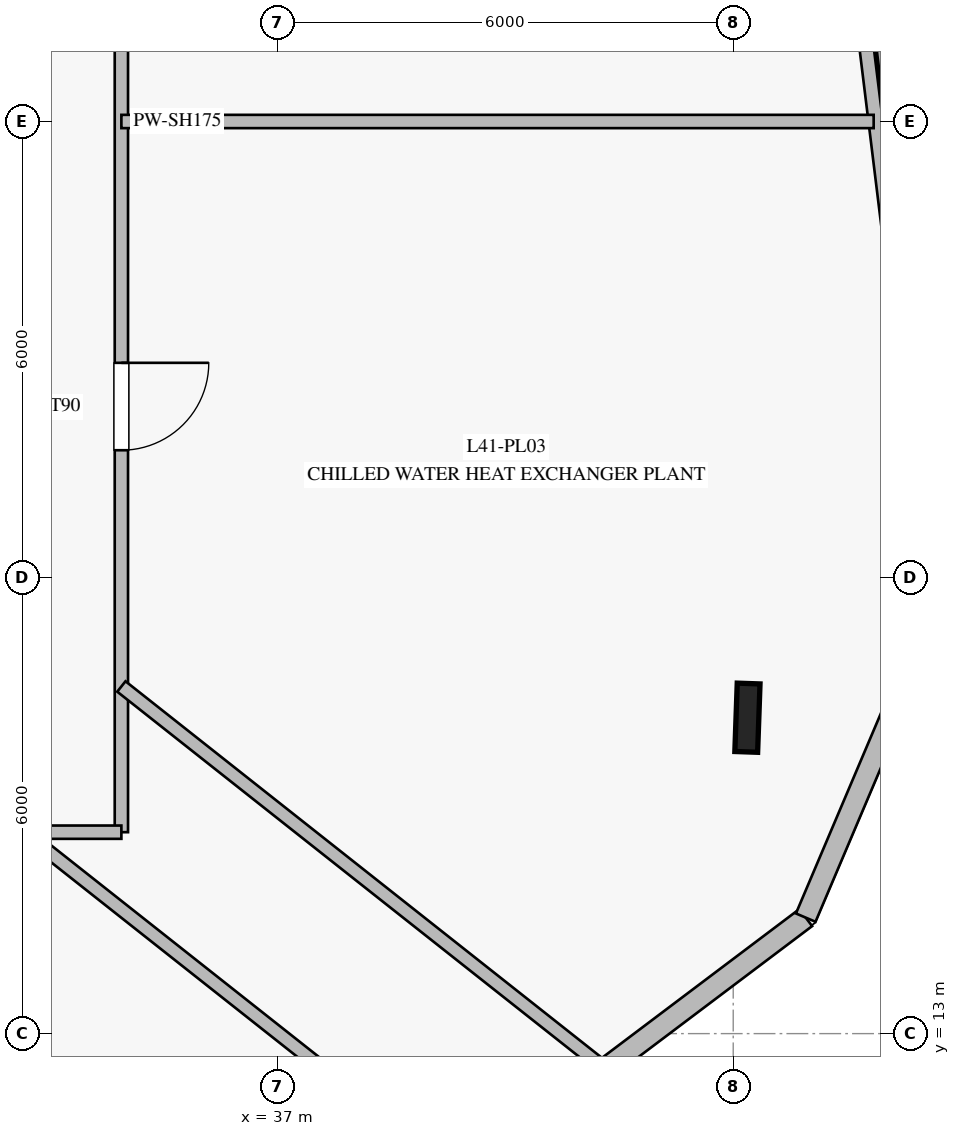
"""IFC4 building model, lengths in metres.
Left out: names, types, materials, properties, quantities, classifications, styles, units other than length and angle.
Written with IfcOpenShell. Run it as: python <this file> out.ifc"""

import sys

from ifc_helpers import new_model, si_unit, direction, frame, frame_2d, origin, origin_2d, place, context, subcontext, project, spatial, rectangle, i_section, extrude, element, fill, save


model = new_model("IFC4")
c1 = context("Model", 3, precision=1e-05, world=origin(), true_north=direction((0.0, 1.0)))
c2 = subcontext(c1, "Body", "Model", "MODEL_VIEW")
j1 = project(units=[si_unit("LENGTHUNIT", "METRE"), si_unit("PLANEANGLEUNIT", "RADIAN")], contexts=[c1])
p1 = place(None, origin())
s1 = spatial("IfcSite", under=j1, at=p1, CompositionType="ELEMENT")
p2 = place(p1, origin())
s2 = spatial("IfcBuilding", under=s1, at=p2, CompositionType="ELEMENT")
p3 = place(p2, frame((0.0, 0.0, 170.4)))
s3 = spatial("IfcBuildingStorey", under=s2, at=p3, CompositionType="ELEMENT", Elevation=170.4)
p4 = place(p3, frame((43.187, 17.156, 0.0), z_axis=(0.0, 0.0, 1.0), x_axis=(0.034899496703, 0.999390827019, 0.0)))
e1 = element("IfcColumn", 1, at=p4, inside=s3, PredefinedType="COLUMN", context=c2, shape_type="SweptSolid", body=[
    extrude(i_section(OverallWidth=0.3, OverallDepth=0.9, WebThickness=0.019, FlangeThickness=0.035, at=origin_2d()), origin(), (0.0, 0.0, 1.0), 5.4),
])
p5 = place(p3, frame((29.844, 3.892, 0.0), z_axis=(0.0, 0.0, 1.0), x_axis=(0.798606661406, 0.601853304684, 0.0)))
e2 = element("IfcWall", 2, at=p5, inside=s3, PredefinedType="STANDARD", context=c2, shape_type="SweptSolid", body=[
    extrude(rectangle(XDim=17.668, YDim=0.28, at=frame_2d((8.834, 0.0))), origin(), (0.0, 0.0, 1.0), 5.14),
])
p6 = place(p3, frame((43.954, 14.526, 0.0), z_axis=(0.0, 0.0, 1.0), x_axis=(0.390733557702, 0.920503822309, 0.0)))
e3 = element("IfcWall", 3, at=p6, inside=s3, PredefinedType="STANDARD", context=c2, shape_type="SweptSolid", body=[
    extrude(rectangle(XDim=4.471, YDim=0.28, at=frame_2d((2.235, 0.0))), origin(), (0.0, 0.0, 1.0), 5.14),
])
p7 = place(p3, frame((45.701, 18.641, 0.0), z_axis=(0.0, 0.0, 1.0), x_axis=(-0.121845687451, 0.992549055941, 0.0)))
e4 = element("IfcWall", 4, at=p7, inside=s3, PredefinedType="STANDARD", context=c2, shape_type="SweptSolid", body=[
    extrude(rectangle(XDim=17.668, YDim=0.28, at=frame_2d((8.834, 0.0))), origin(), (0.0, 0.0, 1.0), 5.14),
])
p8 = place(p3, frame((34.95, 34.35, 0.0), z_axis=(0.0, 0.0, 1.0), x_axis=(0.0, -1.0, 0.0)))
e5 = element("IfcWall", 5, at=p8, inside=s3, PredefinedType="PARTITIONING", context=c2, shape_type="SweptSolid", body=[
    extrude(rectangle(XDim=18.7, YDim=0.175, at=frame_2d((9.35, 0.0))), origin(), (0.0, 0.0, 1.0), 3.54),
])
p9 = place(p8, frame((12.525, 0.0, 0.0)))
e6 = element("IfcOpeningElement", 6, at=p9, cuts=e5, PredefinedType="OPENING", context=c2, shape_type="SweptSolid", body=[
    extrude(rectangle(XDim=1.15, YDim=2.2, at=frame_2d((0.575, 1.1))), frame((0.0, 0.098, 0.0), z_axis=(0.0, -1.0, 0.0), x_axis=(1.0, 0.0, 0.0)), (0.0, 0.0, 1.0), 0.195),
])
p10 = place(p8, frame((5.2, 0.0, 0.0)))
e7 = element("IfcOpeningElement", 7, at=p10, cuts=e5, PredefinedType="OPENING", context=c2, shape_type="SweptSolid", body=[
    extrude(rectangle(XDim=1.15, YDim=2.2, at=frame_2d((0.575, 1.1))), frame((0.0, 0.098, 0.0), z_axis=(0.0, -1.0, 0.0), x_axis=(1.0, 0.0, 0.0)), (0.0, 0.0, 1.0), 0.195),
])
p11 = place(p3, frame((34.95, 15.65, 0.0), z_axis=(0.0, 0.0, 1.0), x_axis=(-1.0, 0.0, 0.0)))
e8 = element("IfcWall", 8, at=p11, inside=s3, PredefinedType="PARTITIONING", context=c2, shape_type="SweptSolid", body=[
    extrude(rectangle(XDim=19.9, YDim=0.175, at=frame_2d((9.95, 0.0))), origin(), (0.0, 0.0, 1.0), 3.54),
])
p12 = place(p11, frame((9.611, 0.0, 0.0)))
e9 = element("IfcOpeningElement", 9, at=p12, cuts=e8, PredefinedType="OPENING", context=c2, shape_type="SweptSolid", body=[
    extrude(rectangle(XDim=1.15, YDim=2.2, at=frame_2d((0.575, 1.1))), frame((0.0, 0.098, 0.0), z_axis=(0.0, -1.0, 0.0), x_axis=(1.0, 0.0, 0.0)), (0.0, 0.0, 1.0), 0.195),
])
p13 = place(p3, frame((33.666, 15.65, 0.0), z_axis=(0.0, 0.0, 1.0), x_axis=(0.784600993116, -0.620001033549, 0.0)))
e10 = element("IfcWall", 10, at=p13, inside=s3, PredefinedType="PARTITIONING", context=c2, shape_type="SweptSolid", body=[
    extrude(rectangle(XDim=7.254, YDim=0.175, at=frame_2d((3.627, 0.0))), origin(), (0.0, 0.0, 1.0), 3.53),
])
p14 = place(p3, frame((34.95, 17.567, 0.0), z_axis=(0.0, 0.0, 1.0), x_axis=(0.784559222655, -0.620053889712, 0.0)))
e11 = element("IfcWall", 11, at=p14, inside=s3, PredefinedType="PARTITIONING", context=c2, shape_type="SweptSolid", body=[
    extrude(rectangle(XDim=8.038, YDim=0.175, at=frame_2d((4.019, 0.0))), origin(), (0.0, 0.0, 1.0), 3.53),
])
p15 = place(p3, frame((34.95, 25.0, 0.0), z_axis=(0.0, 0.0, 1.0), x_axis=(1.0, 0.0, 0.0)))
e12 = element("IfcWall", 12, at=p15, inside=s3, PredefinedType="PARTITIONING", context=c2, shape_type="SweptSolid", body=[
    extrude(rectangle(XDim=9.898, YDim=0.175, at=frame_2d((4.949, 0.0))), origin(), (0.0, 0.0, 1.0), 3.53),
])
p16 = place(p9, origin())
e13 = element("IfcDoor", 13, at=p16, inside=s3, OperationType="SINGLE_SWING_LEFT", PredefinedType="DOOR", context=c2, shape_type="SweptSolid", body=[
    extrude(rectangle(XDim=1.15, YDim=2.2, at=frame_2d((0.575, 1.1))), frame((0.0, 0.025, 0.0), z_axis=(0.0, -1.0, 0.0), x_axis=(1.0, 0.0, 0.0)), (0.0, 0.0, 1.0), 0.05),
])
fill(e6, e13)
save(model, sys.argv[1])
